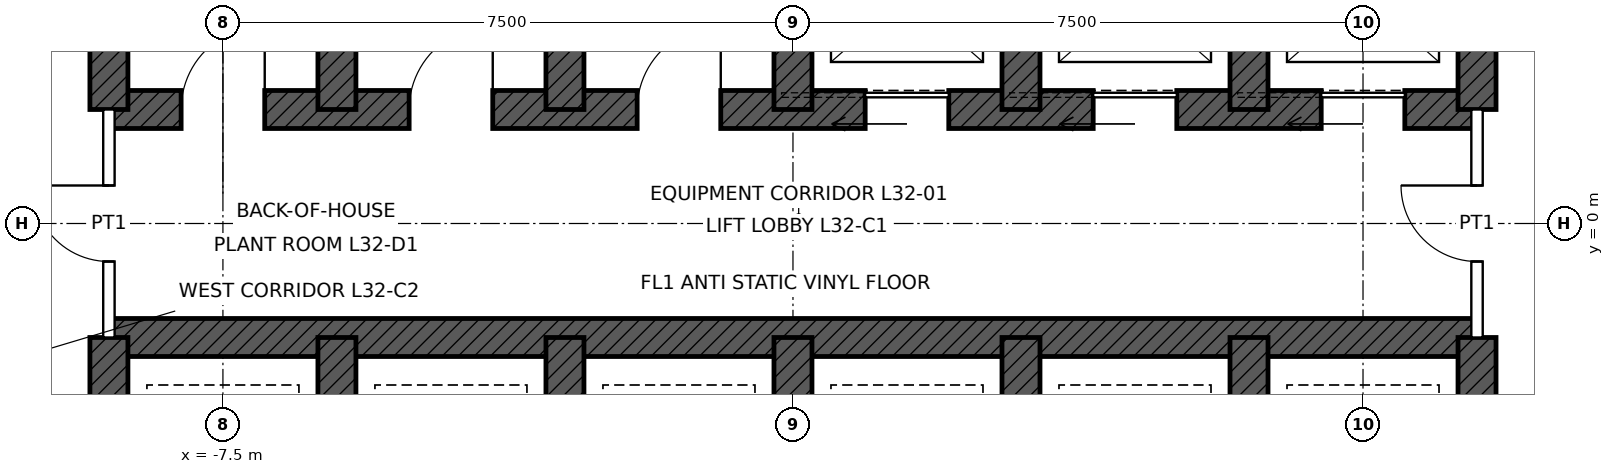
"""IFC4 building model, lengths in metres.
Left out: names, types, materials, properties, quantities, classifications, styles, units other than length and angle.
Written with IfcOpenShell. Run it as: python <this file> out.ifc"""

import sys

from ifc_helpers import new_model, si_unit, direction, frame, frame_2d, origin, place, context, subcontext, project, spatial, rectangle, extrude, element, fill, save


model = new_model("IFC4")
c1 = context("Model", 3, precision=1e-05, world=origin(), true_north=direction((0.0, 1.0)))
c2 = subcontext(c1, "Body", "Model", "MODEL_VIEW")
j1 = project(units=[si_unit("LENGTHUNIT", "METRE"), si_unit("PLANEANGLEUNIT", "RADIAN")], contexts=[c1])
p1 = place(None, origin())
s1 = spatial("IfcSite", under=j1, at=p1, CompositionType="ELEMENT")
p2 = place(p1, origin())
s2 = spatial("IfcBuilding", under=s1, at=p2, CompositionType="ELEMENT")
p3 = place(p2, frame((0.0, 0.0, 158.4)))
s3 = spatial("IfcBuildingStorey", under=s2, at=p3, CompositionType="ELEMENT", Elevation=158.4)
p4 = place(p3, frame((-9.0, 1.5, 0.0), z_axis=(0.0, 0.0, 1.0), x_axis=(1.0, 0.0, 0.0)))
e1 = element("IfcWall", 1, at=p4, inside=s3, PredefinedType="SHEAR", context=c2, shape_type="SweptSolid", body=[
    extrude(rectangle(XDim=18.0, YDim=0.5, at=frame_2d((9.0, 0.0))), origin(), (0.0, 0.0, 1.0), 4.5),
])
p5 = place(p4, frame((9.95, 0.0, 0.0)))
e2 = element("IfcOpeningElement", 2, at=p5, cuts=e1, PredefinedType="OPENING", context=c2, shape_type="SweptSolid", body=[
    extrude(rectangle(XDim=1.1, YDim=2.1, at=frame_2d((0.55, 1.05))), frame((0.0, 0.26, 0.0), z_axis=(0.0, -1.0, 0.0), x_axis=(1.0, 0.0, 0.0)), (0.0, 0.0, 1.0), 0.52),
])
p6 = place(p4, frame((12.95, 0.0, 0.0)))
e3 = element("IfcOpeningElement", 3, at=p6, cuts=e1, PredefinedType="OPENING", context=c2, shape_type="SweptSolid", body=[
    extrude(rectangle(XDim=1.1, YDim=2.1, at=frame_2d((0.55, 1.05))), frame((0.0, 0.26, 0.0), z_axis=(0.0, -1.0, 0.0), x_axis=(1.0, 0.0, 0.0)), (0.0, 0.0, 1.0), 0.52),
])
p7 = place(p4, frame((15.95, 0.0, 0.0)))
e4 = element("IfcOpeningElement", 4, at=p7, cuts=e1, PredefinedType="OPENING", context=c2, shape_type="SweptSolid", body=[
    extrude(rectangle(XDim=1.1, YDim=2.1, at=frame_2d((0.55, 1.05))), frame((0.0, 0.26, 0.0), z_axis=(0.0, -1.0, 0.0), x_axis=(1.0, 0.0, 0.0)), (0.0, 0.0, 1.0), 0.52),
])
p8 = place(p4, frame((0.95, 0.0, 0.0)))
e5 = element("IfcOpeningElement", 5, at=p8, cuts=e1, PredefinedType="OPENING", context=c2, shape_type="SweptSolid", body=[
    extrude(rectangle(XDim=1.1, YDim=2.1, at=frame_2d((0.55, 1.05))), frame((0.0, 0.26, 0.0), z_axis=(0.0, -1.0, 0.0), x_axis=(1.0, 0.0, 0.0)), (0.0, 0.0, 1.0), 0.52),
])
p9 = place(p4, frame((3.95, 0.0, 0.0)))
e6 = element("IfcOpeningElement", 6, at=p9, cuts=e1, PredefinedType="OPENING", context=c2, shape_type="SweptSolid", body=[
    extrude(rectangle(XDim=1.1, YDim=2.1, at=frame_2d((0.55, 1.05))), frame((0.0, 0.26, 0.0), z_axis=(0.0, -1.0, 0.0), x_axis=(1.0, 0.0, 0.0)), (0.0, 0.0, 1.0), 0.52),
])
p10 = place(p4, frame((6.95, 0.0, 0.0)))
e7 = element("IfcOpeningElement", 7, at=p10, cuts=e1, PredefinedType="OPENING", context=c2, shape_type="SweptSolid", body=[
    extrude(rectangle(XDim=1.1, YDim=2.1, at=frame_2d((0.55, 1.05))), frame((0.0, 0.26, 0.0), z_axis=(0.0, -1.0, 0.0), x_axis=(1.0, 0.0, 0.0)), (0.0, 0.0, 1.0), 0.52),
])
p11 = place(p3, frame((-9.0, -1.5, 0.0), z_axis=(0.0, 0.0, 1.0), x_axis=(1.0, 0.0, 0.0)))
e8 = element("IfcWall", 8, at=p11, inside=s3, PredefinedType="SHEAR", context=c2, shape_type="SweptSolid", body=[
    extrude(rectangle(XDim=18.0, YDim=0.5, at=frame_2d((9.0, 0.0))), origin(), (0.0, 0.0, 1.0), 4.5),
])
for number, where, z_axis, x_axis in (
    (9, (-9.0, 1.5, 0.0), (0.0, 0.0, 1.0), (0.0, 1.0, 0.0)),
    (10, (9.0, 1.5, 0.0), (0.0, 0.0, 1.0), (0.0, 1.0, 0.0)),
    (11, (-9.0, -4.5, 0.0), (0.0, 0.0, 1.0), (0.0, 1.0, 0.0)),
    (12, (9.0, -4.5, 0.0), (0.0, 0.0, 1.0), (0.0, 1.0, 0.0)),
    (13, (-6.0, 1.5, 0.0), (0.0, 0.0, 1.0), (0.0, 1.0, 0.0)),
    (14, (-3.0, 1.5, 0.0), (0.0, 0.0, 1.0), (0.0, 1.0, 0.0)),
    (15, (0.0, 1.5, 0.0), (0.0, 0.0, 1.0), (0.0, 1.0, 0.0)),
    (16, (3.0, 1.5, 0.0), (0.0, 0.0, 1.0), (0.0, 1.0, 0.0)),
    (17, (6.0, 1.5, 0.0), (0.0, 0.0, 1.0), (0.0, 1.0, 0.0)),
    (18, (-6.0, -4.5, 0.0), (0.0, 0.0, 1.0), (0.0, 1.0, 0.0)),
    (19, (-3.0, -4.5, 0.0), (0.0, 0.0, 1.0), (0.0, 1.0, 0.0)),
    (20, (0.0, -4.5, 0.0), (0.0, 0.0, 1.0), (0.0, 1.0, 0.0)),
    (21, (3.0, -4.5, 0.0), (0.0, 0.0, 1.0), (0.0, 1.0, 0.0)),
    (22, (6.0, -4.5, 0.0), (0.0, 0.0, 1.0), (0.0, 1.0, 0.0)),
):
    element("IfcWall", number, at=place(p3, frame(where, z_axis=z_axis, x_axis=x_axis)), inside=s3, PredefinedType="SHEAR", context=c2, shape_type="SweptSolid", body=[
        extrude(rectangle(XDim=3.0, YDim=0.5, at=frame_2d((1.5, 0.0))), origin(), (0.0, 0.0, 1.0), 4.5),
    ])
p12 = place(p3, frame((-9.0, -1.5, 0.0), z_axis=(0.0, 0.0, 1.0), x_axis=(0.0, 1.0, 0.0)))
e23 = element("IfcWall", 23, at=p12, inside=s3, PredefinedType="PARTITIONING", context=c2, shape_type="SweptSolid", body=[
    extrude(rectangle(XDim=3.0, YDim=0.15, at=frame_2d((1.5, 0.0))), origin(), (0.0, 0.0, 1.0), 4.25),
])
p13 = place(p12, frame((1.0, 0.0, 0.0)))
e24 = element("IfcOpeningElement", 24, at=p13, cuts=e23, PredefinedType="OPENING", context=c2, shape_type="SweptSolid", body=[
    extrude(rectangle(XDim=1.0, YDim=2.4, at=frame_2d((0.5, 1.2))), frame((0.0, 0.085, 0.0), z_axis=(0.0, -1.0, 0.0), x_axis=(1.0, 0.0, 0.0)), (0.0, 0.0, 1.0), 0.17),
])
p14 = place(p3, frame((9.0, -1.5, 0.0), z_axis=(0.0, 0.0, 1.0), x_axis=(0.0, 1.0, 0.0)))
e25 = element("IfcWall", 25, at=p14, inside=s3, PredefinedType="PARTITIONING", context=c2, shape_type="SweptSolid", body=[
    extrude(rectangle(XDim=3.0, YDim=0.15, at=frame_2d((1.5, 0.0))), origin(), (0.0, 0.0, 1.0), 4.25),
])
p15 = place(p14, frame((1.0, 0.0, 0.0)))
e26 = element("IfcOpeningElement", 26, at=p15, cuts=e25, PredefinedType="OPENING", context=c2, shape_type="SweptSolid", body=[
    extrude(rectangle(XDim=1.0, YDim=2.4, at=frame_2d((0.5, 1.2))), frame((0.0, 0.085, 0.0), z_axis=(0.0, -1.0, 0.0), x_axis=(1.0, 0.0, 0.0)), (0.0, 0.0, 1.0), 0.17),
])
p16 = place(p5, origin())
e27 = element("IfcDoor", 27, at=p16, inside=s3, OperationType="SLIDING_TO_LEFT", PredefinedType="DOOR", context=c2, shape_type="SweptSolid", body=[
    extrude(rectangle(XDim=1.1, YDim=2.1, at=frame_2d((0.55, 1.05))), frame((0.0, 0.025, 0.0), z_axis=(0.0, -1.0, 0.0), x_axis=(1.0, 0.0, 0.0)), (0.0, 0.0, 1.0), 0.05),
])
fill(e2, e27)
p17 = place(p6, origin())
e28 = element("IfcDoor", 28, at=p17, inside=s3, OperationType="SLIDING_TO_LEFT", PredefinedType="DOOR", context=c2, shape_type="SweptSolid", body=[
    extrude(rectangle(XDim=1.1, YDim=2.1, at=frame_2d((0.55, 1.05))), frame((0.0, 0.025, 0.0), z_axis=(0.0, -1.0, 0.0), x_axis=(1.0, 0.0, 0.0)), (0.0, 0.0, 1.0), 0.05),
])
fill(e3, e28)
p18 = place(p7, origin())
e29 = element("IfcDoor", 29, at=p18, inside=s3, OperationType="SLIDING_TO_LEFT", PredefinedType="DOOR", context=c2, shape_type="SweptSolid", body=[
    extrude(rectangle(XDim=1.1, YDim=2.1, at=frame_2d((0.55, 1.05))), frame((0.0, 0.025, 0.0), z_axis=(0.0, -1.0, 0.0), x_axis=(1.0, 0.0, 0.0)), (0.0, 0.0, 1.0), 0.05),
])
fill(e4, e29)
p19 = place(p13, origin())
e30 = element("IfcDoor", 30, at=p19, inside=s3, OperationType="SINGLE_SWING_RIGHT", PredefinedType="DOOR", context=c2, shape_type="SweptSolid", body=[
    extrude(rectangle(XDim=1.0, YDim=2.4, at=frame_2d((0.5, 1.2))), frame((0.0, 0.025, 0.0), z_axis=(0.0, -1.0, 0.0), x_axis=(1.0, 0.0, 0.0)), (0.0, 0.0, 1.0), 0.05),
])
fill(e24, e30)
p20 = place(p15, origin())
e31 = element("IfcDoor", 31, at=p20, inside=s3, OperationType="SINGLE_SWING_RIGHT", PredefinedType="DOOR", context=c2, shape_type="SweptSolid", body=[
    extrude(rectangle(XDim=1.0, YDim=2.4, at=frame_2d((0.5, 1.2))), frame((0.0, 0.025, 0.0), z_axis=(0.0, -1.0, 0.0), x_axis=(1.0, 0.0, 0.0)), (0.0, 0.0, 1.0), 0.05),
])
fill(e26, e31)
p21 = place(p8, origin())
e32 = element("IfcDoor", 32, at=p21, inside=s3, OperationType="SINGLE_SWING_RIGHT", PredefinedType="DOOR", context=c2, shape_type="SweptSolid", body=[
    extrude(rectangle(XDim=1.1, YDim=2.1, at=frame_2d((0.55, 1.05))), frame((0.0, 0.025, 0.0), z_axis=(0.0, -1.0, 0.0), x_axis=(1.0, 0.0, 0.0)), (0.0, 0.0, 1.0), 0.05),
])
fill(e5, e32)
p22 = place(p9, origin())
e33 = element("IfcDoor", 33, at=p22, inside=s3, OperationType="SINGLE_SWING_RIGHT", PredefinedType="DOOR", context=c2, shape_type="SweptSolid", body=[
    extrude(rectangle(XDim=1.1, YDim=2.1, at=frame_2d((0.55, 1.05))), frame((0.0, 0.025, 0.0), z_axis=(0.0, -1.0, 0.0), x_axis=(1.0, 0.0, 0.0)), (0.0, 0.0, 1.0), 0.05),
])
fill(e6, e33)
p23 = place(p10, origin())
e34 = element("IfcDoor", 34, at=p23, inside=s3, OperationType="SINGLE_SWING_RIGHT", PredefinedType="DOOR", context=c2, shape_type="SweptSolid", body=[
    extrude(rectangle(XDim=1.1, YDim=2.1, at=frame_2d((0.55, 1.05))), frame((0.0, 0.025, 0.0), z_axis=(0.0, -1.0, 0.0), x_axis=(1.0, 0.0, 0.0)), (0.0, 0.0, 1.0), 0.05),
])
fill(e7, e34)
save(model, sys.argv[1])
